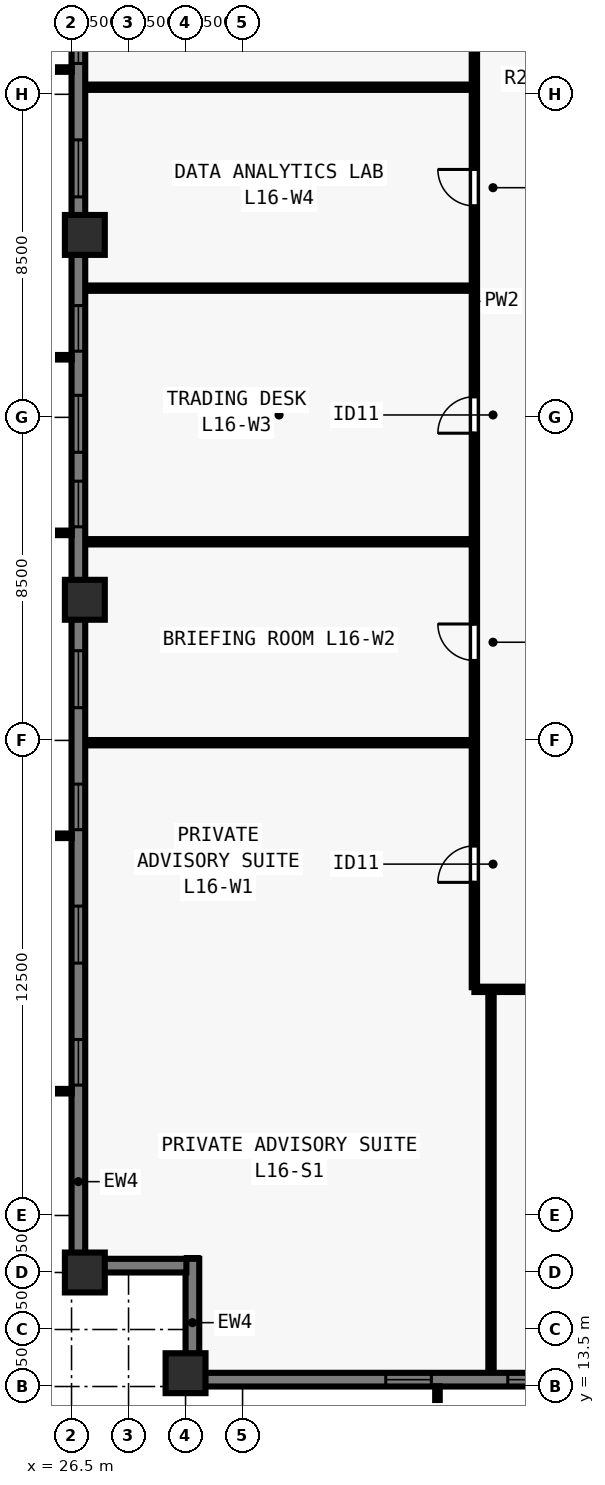
"""IFC4 building model, lengths in metres.
Left out: names, types, materials, properties, quantities, classifications, styles, units other than length and angle.
Written with IfcOpenShell. Run it as: python <this file> out.ifc"""

import sys

from ifc_helpers import new_model, si_unit, direction, frame, frame_2d, origin, origin_2d, place, context, subcontext, project, spatial, rectangle, extrude, element, fill, save


model = new_model("IFC4")
c1 = context("Model", 3, precision=1e-05, world=origin(), true_north=direction((0.0, 1.0)))
c2 = subcontext(c1, "Body", "Model", "MODEL_VIEW")
j1 = project(units=[si_unit("LENGTHUNIT", "METRE"), si_unit("PLANEANGLEUNIT", "RADIAN")], contexts=[c1])
p1 = place(None, origin())
s1 = spatial("IfcSite", under=j1, at=p1, CompositionType="ELEMENT")
p2 = place(p1, origin())
s2 = spatial("IfcBuilding", under=s1, at=p2, CompositionType="ELEMENT")
p3 = place(p2, frame((0.0, 0.0, 62.0)))
s3 = spatial("IfcBuildingStorey", under=s2, at=p3, CompositionType="ELEMENT", Elevation=62.0)
for number, where, z_axis, x_axis in (
    (1, (29.5, 13.85, 0.0), (0.0, 0.0, 1.0), (1.0, 0.0, 0.0)),
    (2, (26.85, 43.8, 0.0), (0.0, 0.0, 1.0), (0.0, 1.0, 0.0)),
    (3, (26.85, 34.2, 0.0), (0.0, 0.0, 1.0), (0.0, 1.0, 0.0)),
    (4, (26.85, 16.5, 0.0), (0.0, 0.0, 1.0), (0.0, 1.0, 0.0)),
):
    element("IfcColumn", number, at=place(p3, frame(where, z_axis=z_axis, x_axis=x_axis)), inside=s3, PredefinedType="COLUMN", context=c2, shape_type="SweptSolid", body=[
        extrude(rectangle(XDim=1.05, YDim=1.05, at=origin_2d()), origin(), (0.0, 0.0, 1.0), 3.5),
    ])
p4 = place(p3, frame((74.5, 13.68, 0.0), z_axis=(0.0, 0.0, 1.0), x_axis=(-1.0, 0.0, 0.0)))
e5 = element("IfcWall", 5, at=p4, inside=s3, PredefinedType="SOLIDWALL", context=c2, shape_type="SweptSolid", body=[
    extrude(rectangle(XDim=44.662, YDim=0.36, at=frame_2d((22.331, 0.0))), origin(), (0.0, 0.0, 1.0), 3.28),
])
p5 = place(p4, frame((4.93, 0.0, 0.8)))
e6 = element("IfcOpeningElement", 6, at=p5, cuts=e5, PredefinedType="OPENING", context=c2, shape_type="SweptSolid", body=[
    extrude(rectangle(XDim=1.2, YDim=1.544, at=frame_2d((0.6, 0.772))), frame((0.0, 0.19, 0.0), z_axis=(0.0, -1.0, 0.0), x_axis=(1.0, 0.0, 0.0)), (0.0, 0.0, 1.0), 0.38),
])
p6 = place(p4, frame((8.59, 0.0, 0.8)))
e7 = element("IfcOpeningElement", 7, at=p6, cuts=e5, PredefinedType="OPENING", context=c2, shape_type="SweptSolid", body=[
    extrude(rectangle(XDim=1.5, YDim=1.544, at=frame_2d((0.75, 0.772))), frame((0.0, 0.19, 0.0), z_axis=(0.0, -1.0, 0.0), x_axis=(1.0, 0.0, 0.0)), (0.0, 0.0, 1.0), 0.38),
])
p7 = place(p4, frame((11.65, 0.0, 0.8)))
e8 = element("IfcOpeningElement", 8, at=p7, cuts=e5, PredefinedType="OPENING", context=c2, shape_type="SweptSolid", body=[
    extrude(rectangle(XDim=1.2, YDim=1.544, at=frame_2d((0.6, 0.772))), frame((0.0, 0.19, 0.0), z_axis=(0.0, -1.0, 0.0), x_axis=(1.0, 0.0, 0.0)), (0.0, 0.0, 1.0), 0.38),
])
p8 = place(p4, frame((14.861, 0.0, 0.8)))
e9 = element("IfcOpeningElement", 9, at=p8, cuts=e5, PredefinedType="OPENING", context=c2, shape_type="SweptSolid", body=[
    extrude(rectangle(XDim=1.5, YDim=1.544, at=frame_2d((0.75, 0.772))), frame((0.0, 0.19, 0.0), z_axis=(0.0, -1.0, 0.0), x_axis=(1.0, 0.0, 0.0)), (0.0, 0.0, 1.0), 0.38),
])
p9 = place(p4, frame((18.821, 0.0, 0.8)))
e10 = element("IfcOpeningElement", 10, at=p9, cuts=e5, PredefinedType="OPENING", context=c2, shape_type="SweptSolid", body=[
    extrude(rectangle(XDim=1.2, YDim=1.544, at=frame_2d((0.6, 0.772))), frame((0.0, 0.19, 0.0), z_axis=(0.0, -1.0, 0.0), x_axis=(1.0, 0.0, 0.0)), (0.0, 0.0, 1.0), 0.38),
])
p10 = place(p4, frame((21.581, 0.0, 0.8)))
e11 = element("IfcOpeningElement", 11, at=p10, cuts=e5, PredefinedType="OPENING", context=c2, shape_type="SweptSolid", body=[
    extrude(rectangle(XDim=1.5, YDim=1.544, at=frame_2d((0.75, 0.772))), frame((0.0, 0.19, 0.0), z_axis=(0.0, -1.0, 0.0), x_axis=(1.0, 0.0, 0.0)), (0.0, 0.0, 1.0), 0.38),
])
p11 = place(p4, frame((25.091, 0.0, 0.8)))
e12 = element("IfcOpeningElement", 12, at=p11, cuts=e5, PredefinedType="OPENING", context=c2, shape_type="SweptSolid", body=[
    extrude(rectangle(XDim=1.2, YDim=1.544, at=frame_2d((0.6, 0.772))), frame((0.0, 0.19, 0.0), z_axis=(0.0, -1.0, 0.0), x_axis=(1.0, 0.0, 0.0)), (0.0, 0.0, 1.0), 0.38),
])
p12 = place(p4, frame((28.302, 0.0, 0.8)))
e13 = element("IfcOpeningElement", 13, at=p12, cuts=e5, PredefinedType="OPENING", context=c2, shape_type="SweptSolid", body=[
    extrude(rectangle(XDim=1.5, YDim=1.544, at=frame_2d((0.75, 0.772))), frame((0.0, 0.19, 0.0), z_axis=(0.0, -1.0, 0.0), x_axis=(1.0, 0.0, 0.0)), (0.0, 0.0, 1.0), 0.38),
])
p13 = place(p4, frame((31.812, 0.0, 0.8)))
e14 = element("IfcOpeningElement", 14, at=p13, cuts=e5, PredefinedType="OPENING", context=c2, shape_type="SweptSolid", body=[
    extrude(rectangle(XDim=1.2, YDim=1.544, at=frame_2d((0.6, 0.772))), frame((0.0, 0.19, 0.0), z_axis=(0.0, -1.0, 0.0), x_axis=(1.0, 0.0, 0.0)), (0.0, 0.0, 1.0), 0.38),
])
p14 = place(p4, frame((35.022, 0.0, 0.8)))
e15 = element("IfcOpeningElement", 15, at=p14, cuts=e5, PredefinedType="OPENING", context=c2, shape_type="SweptSolid", body=[
    extrude(rectangle(XDim=1.5, YDim=1.544, at=frame_2d((0.75, 0.772))), frame((0.0, 0.19, 0.0), z_axis=(0.0, -1.0, 0.0), x_axis=(1.0, 0.0, 0.0)), (0.0, 0.0, 1.0), 0.38),
])
p15 = place(p4, frame((38.532, 0.0, 0.8)))
e16 = element("IfcOpeningElement", 16, at=p15, cuts=e5, PredefinedType="OPENING", context=c2, shape_type="SweptSolid", body=[
    extrude(rectangle(XDim=1.2, YDim=1.544, at=frame_2d((0.6, 0.772))), frame((0.0, 0.19, 0.0), z_axis=(0.0, -1.0, 0.0), x_axis=(1.0, 0.0, 0.0)), (0.0, 0.0, 1.0), 0.38),
])
p16 = place(p3, frame((29.68, 13.5, 0.0), z_axis=(0.0, 0.0, 1.0), x_axis=(0.0, 1.0, 0.0)))
e17 = element("IfcWall", 17, at=p16, inside=s3, PredefinedType="SOLIDWALL", context=c2, shape_type="SweptSolid", body=[
    extrude(rectangle(XDim=3.36, YDim=0.36, at=frame_2d((1.68, 0.0))), origin(), (0.0, 0.0, 1.0), 3.28),
])
p17 = place(p3, frame((29.522, 16.68, 0.0), z_axis=(0.0, 0.0, 1.0), x_axis=(-1.0, 0.0, 0.0)))
e18 = element("IfcWall", 18, at=p17, inside=s3, PredefinedType="SOLIDWALL", context=c2, shape_type="SweptSolid", body=[
    extrude(rectangle(XDim=2.684, YDim=0.36, at=frame_2d((1.342, 0.0))), origin(), (0.0, 0.0, 1.0), 3.28),
])
p18 = place(p3, frame((26.68, 16.5, 0.0), z_axis=(0.0, 0.0, 1.0), x_axis=(0.0, 1.0, 0.0)))
e19 = element("IfcWall", 19, at=p18, inside=s3, PredefinedType="SOLIDWALL", context=c2, shape_type="SweptSolid", body=[
    extrude(rectangle(XDim=44.662, YDim=0.36, at=frame_2d((22.331, 0.0))), origin(), (0.0, 0.0, 1.0), 3.28),
])
p19 = place(p18, frame((4.93, 0.0, 0.8)))
e20 = element("IfcOpeningElement", 20, at=p19, cuts=e19, PredefinedType="OPENING", context=c2, shape_type="SweptSolid", body=[
    extrude(rectangle(XDim=1.2, YDim=1.544, at=frame_2d((0.6, 0.772))), frame((0.0, 0.19, 0.0), z_axis=(0.0, -1.0, 0.0), x_axis=(1.0, 0.0, 0.0)), (0.0, 0.0, 1.0), 0.38),
])
p20 = place(p18, frame((8.14, 0.0, 0.8)))
e21 = element("IfcOpeningElement", 21, at=p20, cuts=e19, PredefinedType="OPENING", context=c2, shape_type="SweptSolid", body=[
    extrude(rectangle(XDim=1.5, YDim=1.544, at=frame_2d((0.75, 0.772))), frame((0.0, 0.19, 0.0), z_axis=(0.0, -1.0, 0.0), x_axis=(1.0, 0.0, 0.0)), (0.0, 0.0, 1.0), 0.38),
])
p21 = place(p18, frame((11.65, 0.0, 0.8)))
e22 = element("IfcOpeningElement", 22, at=p21, cuts=e19, PredefinedType="OPENING", context=c2, shape_type="SweptSolid", body=[
    extrude(rectangle(XDim=1.2, YDim=1.544, at=frame_2d((0.6, 0.772))), frame((0.0, 0.19, 0.0), z_axis=(0.0, -1.0, 0.0), x_axis=(1.0, 0.0, 0.0)), (0.0, 0.0, 1.0), 0.38),
])
p22 = place(p18, frame((14.861, 0.0, 0.8)))
e23 = element("IfcOpeningElement", 23, at=p22, cuts=e19, PredefinedType="OPENING", context=c2, shape_type="SweptSolid", body=[
    extrude(rectangle(XDim=1.5, YDim=1.544, at=frame_2d((0.75, 0.772))), frame((0.0, 0.19, 0.0), z_axis=(0.0, -1.0, 0.0), x_axis=(1.0, 0.0, 0.0)), (0.0, 0.0, 1.0), 0.38),
])
p23 = place(p18, frame((19.621, 0.0, 0.8)))
e24 = element("IfcOpeningElement", 24, at=p23, cuts=e19, PredefinedType="OPENING", context=c2, shape_type="SweptSolid", body=[
    extrude(rectangle(XDim=1.2, YDim=1.544, at=frame_2d((0.6, 0.772))), frame((0.0, 0.19, 0.0), z_axis=(0.0, -1.0, 0.0), x_axis=(1.0, 0.0, 0.0)), (0.0, 0.0, 1.0), 0.38),
])
p24 = place(p18, frame((21.581, 0.0, 0.8)))
e25 = element("IfcOpeningElement", 25, at=p24, cuts=e19, PredefinedType="OPENING", context=c2, shape_type="SweptSolid", body=[
    extrude(rectangle(XDim=1.5, YDim=1.544, at=frame_2d((0.75, 0.772))), frame((0.0, 0.19, 0.0), z_axis=(0.0, -1.0, 0.0), x_axis=(1.0, 0.0, 0.0)), (0.0, 0.0, 1.0), 0.38),
])
p25 = place(p18, frame((24.241, 0.0, 0.8)))
e26 = element("IfcOpeningElement", 26, at=p25, cuts=e19, PredefinedType="OPENING", context=c2, shape_type="SweptSolid", body=[
    extrude(rectangle(XDim=1.2, YDim=1.544, at=frame_2d((0.6, 0.772))), frame((0.0, 0.19, 0.0), z_axis=(0.0, -1.0, 0.0), x_axis=(1.0, 0.0, 0.0)), (0.0, 0.0, 1.0), 0.38),
])
p26 = place(p18, frame((28.302, 0.0, 0.8)))
e27 = element("IfcOpeningElement", 27, at=p26, cuts=e19, PredefinedType="OPENING", context=c2, shape_type="SweptSolid", body=[
    extrude(rectangle(XDim=1.5, YDim=1.544, at=frame_2d((0.75, 0.772))), frame((0.0, 0.19, 0.0), z_axis=(0.0, -1.0, 0.0), x_axis=(1.0, 0.0, 0.0)), (0.0, 0.0, 1.0), 0.38),
])
p27 = place(p18, frame((31.812, 0.0, 0.8)))
e28 = element("IfcOpeningElement", 28, at=p27, cuts=e19, PredefinedType="OPENING", context=c2, shape_type="SweptSolid", body=[
    extrude(rectangle(XDim=1.2, YDim=1.544, at=frame_2d((0.6, 0.772))), frame((0.0, 0.19, 0.0), z_axis=(0.0, -1.0, 0.0), x_axis=(1.0, 0.0, 0.0)), (0.0, 0.0, 1.0), 0.38),
])
p28 = place(p18, frame((35.022, 0.0, 0.8)))
e29 = element("IfcOpeningElement", 29, at=p28, cuts=e19, PredefinedType="OPENING", context=c2, shape_type="SweptSolid", body=[
    extrude(rectangle(XDim=1.5, YDim=1.544, at=frame_2d((0.75, 0.772))), frame((0.0, 0.19, 0.0), z_axis=(0.0, -1.0, 0.0), x_axis=(1.0, 0.0, 0.0)), (0.0, 0.0, 1.0), 0.38),
])
p29 = place(p18, frame((38.532, 0.0, 0.8)))
e30 = element("IfcOpeningElement", 30, at=p29, cuts=e19, PredefinedType="OPENING", context=c2, shape_type="SweptSolid", body=[
    extrude(rectangle(XDim=1.2, YDim=1.544, at=frame_2d((0.6, 0.772))), frame((0.0, 0.19, 0.0), z_axis=(0.0, -1.0, 0.0), x_axis=(1.0, 0.0, 0.0)), (0.0, 0.0, 1.0), 0.38),
])
p30 = place(p3, frame((37.1, 23.95, 0.0), z_axis=(0.0, 0.0, 1.0), x_axis=(1.0, 0.0, 0.0)))
e31 = element("IfcWall", 31, at=p30, inside=s3, PredefinedType="PARTITIONING", context=c2, shape_type="SweptSolid", body=[
    extrude(rectangle(XDim=29.8, YDim=0.14, at=frame_2d((14.9, 0.0))), origin(), (0.0, 0.0, 1.0), 3.28),
])
p31 = place(p30, frame((4.191, 0.0, 0.0)))
e32 = element("IfcOpeningElement", 32, at=p31, cuts=e31, PredefinedType="OPENING", context=c2, shape_type="SweptSolid", body=[
    extrude(rectangle(XDim=0.96, YDim=2.12, at=frame_2d((0.48, 1.06))), frame((0.0, 0.08, 0.0), z_axis=(0.0, -1.0, 0.0), x_axis=(1.0, 0.0, 0.0)), (0.0, 0.0, 1.0), 0.16),
])
p32 = place(p30, frame((5.358, 0.0, 0.0)))
e33 = element("IfcOpeningElement", 33, at=p32, cuts=e31, PredefinedType="OPENING", context=c2, shape_type="SweptSolid", body=[
    extrude(rectangle(XDim=0.96, YDim=2.12, at=frame_2d((0.48, 1.06))), frame((0.0, 0.08, 0.0), z_axis=(0.0, -1.0, 0.0), x_axis=(1.0, 0.0, 0.0)), (0.0, 0.0, 1.0), 0.16),
])
p33 = place(p30, frame((14.51, 0.0, 0.0)))
e34 = element("IfcOpeningElement", 34, at=p33, cuts=e31, PredefinedType="OPENING", context=c2, shape_type="SweptSolid", body=[
    extrude(rectangle(XDim=0.96, YDim=2.12, at=frame_2d((0.48, 1.06))), frame((0.0, 0.08, 0.0), z_axis=(0.0, -1.0, 0.0), x_axis=(1.0, 0.0, 0.0)), (0.0, 0.0, 1.0), 0.16),
])
p34 = place(p30, frame((24.542, 0.0, 0.0)))
e35 = element("IfcOpeningElement", 35, at=p34, cuts=e31, PredefinedType="OPENING", context=c2, shape_type="SweptSolid", body=[
    extrude(rectangle(XDim=0.96, YDim=2.12, at=frame_2d((0.48, 1.06))), frame((0.0, 0.08, 0.0), z_axis=(0.0, -1.0, 0.0), x_axis=(1.0, 0.0, 0.0)), (0.0, 0.0, 1.0), 0.16),
])
p35 = place(p30, frame((28.26, 0.0, 0.0)))
e36 = element("IfcOpeningElement", 36, at=p35, cuts=e31, PredefinedType="OPENING", context=c2, shape_type="SweptSolid", body=[
    extrude(rectangle(XDim=0.96, YDim=2.12, at=frame_2d((0.48, 1.06))), frame((0.0, 0.08, 0.0), z_axis=(0.0, -1.0, 0.0), x_axis=(1.0, 0.0, 0.0)), (0.0, 0.0, 1.0), 0.16),
])
p36 = place(p3, frame((37.1, 24.005, 0.0), z_axis=(0.0, 0.0, 1.0), x_axis=(0.0, 1.0, 0.0)))
e37 = element("IfcWall", 37, at=p36, inside=s3, PredefinedType="PARTITIONING", context=c2, shape_type="SweptSolid", body=[
    extrude(rectangle(XDim=29.99, YDim=0.14, at=frame_2d((14.995, 0.0))), origin(), (0.0, 0.0, 1.0), 3.28),
])
p37 = place(p36, frame((2.76, 0.0, 0.0)))
e38 = element("IfcOpeningElement", 38, at=p37, cuts=e37, PredefinedType="OPENING", context=c2, shape_type="SweptSolid", body=[
    extrude(rectangle(XDim=0.96, YDim=2.12, at=frame_2d((0.48, 1.06))), frame((0.0, 0.08, 0.0), z_axis=(0.0, -1.0, 0.0), x_axis=(1.0, 0.0, 0.0)), (0.0, 0.0, 1.0), 0.16),
])
p38 = place(p36, frame((8.598, 0.0, 0.0)))
e39 = element("IfcOpeningElement", 39, at=p38, cuts=e37, PredefinedType="OPENING", context=c2, shape_type="SweptSolid", body=[
    extrude(rectangle(XDim=0.96, YDim=2.12, at=frame_2d((0.48, 1.06))), frame((0.0, 0.08, 0.0), z_axis=(0.0, -1.0, 0.0), x_axis=(1.0, 0.0, 0.0)), (0.0, 0.0, 1.0), 0.16),
])
p39 = place(p36, frame((14.578, 0.0, 0.0)))
e40 = element("IfcOpeningElement", 40, at=p39, cuts=e37, PredefinedType="OPENING", context=c2, shape_type="SweptSolid", body=[
    extrude(rectangle(XDim=0.96, YDim=2.12, at=frame_2d((0.48, 1.06))), frame((0.0, 0.08, 0.0), z_axis=(0.0, -1.0, 0.0), x_axis=(1.0, 0.0, 0.0)), (0.0, 0.0, 1.0), 0.16),
])
p40 = place(p36, frame((20.558, 0.0, 0.0)))
e41 = element("IfcOpeningElement", 41, at=p40, cuts=e37, PredefinedType="OPENING", context=c2, shape_type="SweptSolid", body=[
    extrude(rectangle(XDim=0.96, YDim=2.12, at=frame_2d((0.48, 1.06))), frame((0.0, 0.08, 0.0), z_axis=(0.0, -1.0, 0.0), x_axis=(1.0, 0.0, 0.0)), (0.0, 0.0, 1.0), 0.16),
])
p41 = place(p36, frame((26.333, 0.0, 0.0)))
e42 = element("IfcOpeningElement", 42, at=p41, cuts=e37, PredefinedType="OPENING", context=c2, shape_type="SweptSolid", body=[
    extrude(rectangle(XDim=0.96, YDim=2.12, at=frame_2d((0.48, 1.06))), frame((0.0, 0.08, 0.0), z_axis=(0.0, -1.0, 0.0), x_axis=(1.0, 0.0, 0.0)), (0.0, 0.0, 1.0), 0.16),
])
p42 = place(p3, frame((37.537, 13.92, 0.0), z_axis=(0.0, 0.0, 1.0), x_axis=(0.0, 1.0, 0.0)))
e43 = element("IfcWall", 43, at=p42, inside=s3, PredefinedType="PARTITIONING", context=c2, shape_type="SweptSolid", body=[
    extrude(rectangle(XDim=9.93, YDim=0.14, at=frame_2d((4.965, 0.0))), origin(), (0.0, 0.0, 1.0), 2.439),
])
p43 = place(p3, frame((26.92, 30.439, 0.0), z_axis=(0.0, 0.0, 1.0), x_axis=(1.0, 0.0, 0.0)))
e44 = element("IfcWall", 44, at=p43, inside=s3, PredefinedType="PARTITIONING", context=c2, shape_type="SweptSolid", body=[
    extrude(rectangle(XDim=10.08, YDim=0.14, at=frame_2d((5.04, 0.0))), origin(), (0.0, 0.0, 1.0), 3.28),
])
p44 = place(p3, frame((26.92, 35.727, 0.0), z_axis=(0.0, 0.0, 1.0), x_axis=(1.0, 0.0, 0.0)))
e45 = element("IfcWall", 45, at=p44, inside=s3, PredefinedType="PARTITIONING", context=c2, shape_type="SweptSolid", body=[
    extrude(rectangle(XDim=10.08, YDim=0.14, at=frame_2d((5.04, 0.0))), origin(), (0.0, 0.0, 1.0), 2.849),
])
for number, where, z_axis, x_axis in (
    (46, (26.92, 42.399, 0.0), (0.0, 0.0, 1.0), (1.0, 0.0, 0.0)),
    (47, (26.92, 47.687, 0.0), (0.0, 0.0, 1.0), (1.0, 0.0, 0.0)),
):
    element("IfcWall", number, at=place(p3, frame(where, z_axis=z_axis, x_axis=x_axis)), inside=s3, PredefinedType="PARTITIONING", context=c2, shape_type="SweptSolid", body=[
        extrude(rectangle(XDim=10.08, YDim=0.14, at=frame_2d((5.04, 0.0))), origin(), (0.0, 0.0, 1.0), 3.28),
    ])
p45 = place(p14, origin())
e48 = element("IfcWindow", 48, at=p45, inside=s3, PartitioningType="SINGLE_PANEL", PredefinedType="WINDOW", context=c2, shape_type="SweptSolid", body=[
    extrude(rectangle(XDim=1.5, YDim=1.544, at=frame_2d((0.75, 0.772))), frame((0.0, -0.05, 0.0), z_axis=(0.0, -1.0, 0.0), x_axis=(1.0, 0.0, 0.0)), (0.0, 0.0, 1.0), 0.06),
])
fill(e15, e48)
p46 = place(p15, origin())
e49 = element("IfcWindow", 49, at=p46, inside=s3, PartitioningType="SINGLE_PANEL", PredefinedType="WINDOW", context=c2, shape_type="SweptSolid", body=[
    extrude(rectangle(XDim=1.2, YDim=1.544, at=frame_2d((0.6, 0.772))), frame((0.0, -0.05, 0.0), z_axis=(0.0, -1.0, 0.0), x_axis=(1.0, 0.0, 0.0)), (0.0, 0.0, 1.0), 0.06),
])
fill(e16, e49)
p47 = place(p19, origin())
e50 = element("IfcWindow", 50, at=p47, inside=s3, PartitioningType="SINGLE_PANEL", PredefinedType="WINDOW", context=c2, shape_type="SweptSolid", body=[
    extrude(rectangle(XDim=1.2, YDim=1.544, at=frame_2d((0.6, 0.772))), frame((0.0, -0.05, 0.0), z_axis=(0.0, -1.0, 0.0), x_axis=(1.0, 0.0, 0.0)), (0.0, 0.0, 1.0), 0.06),
])
fill(e20, e50)
p48 = place(p20, origin())
e51 = element("IfcWindow", 51, at=p48, inside=s3, PartitioningType="SINGLE_PANEL", PredefinedType="WINDOW", context=c2, shape_type="SweptSolid", body=[
    extrude(rectangle(XDim=1.5, YDim=1.544, at=frame_2d((0.75, 0.772))), frame((0.0, -0.05, 0.0), z_axis=(0.0, -1.0, 0.0), x_axis=(1.0, 0.0, 0.0)), (0.0, 0.0, 1.0), 0.06),
])
fill(e21, e51)
p49 = place(p21, origin())
e52 = element("IfcWindow", 52, at=p49, inside=s3, PartitioningType="SINGLE_PANEL", PredefinedType="WINDOW", context=c2, shape_type="SweptSolid", body=[
    extrude(rectangle(XDim=1.2, YDim=1.544, at=frame_2d((0.6, 0.772))), frame((0.0, -0.05, 0.0), z_axis=(0.0, -1.0, 0.0), x_axis=(1.0, 0.0, 0.0)), (0.0, 0.0, 1.0), 0.06),
])
fill(e22, e52)
p50 = place(p22, origin())
e53 = element("IfcWindow", 53, at=p50, inside=s3, PartitioningType="SINGLE_PANEL", PredefinedType="WINDOW", context=c2, shape_type="SweptSolid", body=[
    extrude(rectangle(XDim=1.5, YDim=1.544, at=frame_2d((0.75, 0.772))), frame((0.0, -0.05, 0.0), z_axis=(0.0, -1.0, 0.0), x_axis=(1.0, 0.0, 0.0)), (0.0, 0.0, 1.0), 0.06),
])
fill(e23, e53)
p51 = place(p23, origin())
e54 = element("IfcWindow", 54, at=p51, inside=s3, PartitioningType="SINGLE_PANEL", PredefinedType="WINDOW", context=c2, shape_type="SweptSolid", body=[
    extrude(rectangle(XDim=1.2, YDim=1.544, at=frame_2d((0.6, 0.772))), frame((0.0, -0.05, 0.0), z_axis=(0.0, -1.0, 0.0), x_axis=(1.0, 0.0, 0.0)), (0.0, 0.0, 1.0), 0.06),
])
fill(e24, e54)
p52 = place(p24, origin())
e55 = element("IfcWindow", 55, at=p52, inside=s3, PartitioningType="SINGLE_PANEL", PredefinedType="WINDOW", context=c2, shape_type="SweptSolid", body=[
    extrude(rectangle(XDim=1.5, YDim=1.544, at=frame_2d((0.75, 0.772))), frame((0.0, -0.05, 0.0), z_axis=(0.0, -1.0, 0.0), x_axis=(1.0, 0.0, 0.0)), (0.0, 0.0, 1.0), 0.06),
])
fill(e25, e55)
p53 = place(p25, origin())
e56 = element("IfcWindow", 56, at=p53, inside=s3, PartitioningType="SINGLE_PANEL", PredefinedType="WINDOW", context=c2, shape_type="SweptSolid", body=[
    extrude(rectangle(XDim=1.2, YDim=1.544, at=frame_2d((0.6, 0.772))), frame((0.0, -0.05, 0.0), z_axis=(0.0, -1.0, 0.0), x_axis=(1.0, 0.0, 0.0)), (0.0, 0.0, 1.0), 0.06),
])
fill(e26, e56)
p54 = place(p26, origin())
e57 = element("IfcWindow", 57, at=p54, inside=s3, PartitioningType="SINGLE_PANEL", PredefinedType="WINDOW", context=c2, shape_type="SweptSolid", body=[
    extrude(rectangle(XDim=1.5, YDim=1.544, at=frame_2d((0.75, 0.772))), frame((0.0, -0.05, 0.0), z_axis=(0.0, -1.0, 0.0), x_axis=(1.0, 0.0, 0.0)), (0.0, 0.0, 1.0), 0.06),
])
fill(e27, e57)
p55 = place(p27, origin())
e58 = element("IfcWindow", 58, at=p55, inside=s3, PartitioningType="SINGLE_PANEL", PredefinedType="WINDOW", context=c2, shape_type="SweptSolid", body=[
    extrude(rectangle(XDim=1.2, YDim=1.544, at=frame_2d((0.6, 0.772))), frame((0.0, -0.05, 0.0), z_axis=(0.0, -1.0, 0.0), x_axis=(1.0, 0.0, 0.0)), (0.0, 0.0, 1.0), 0.06),
])
fill(e28, e58)
p56 = place(p37, origin())
e59 = element("IfcDoor", 59, at=p56, inside=s3, OperationType="SINGLE_SWING_LEFT", PredefinedType="DOOR", context=c2, shape_type="SweptSolid", body=[
    extrude(rectangle(XDim=0.96, YDim=2.12, at=frame_2d((0.48, 1.06))), frame((0.0, 0.025, 0.0), z_axis=(0.0, -1.0, 0.0), x_axis=(1.0, 0.0, 0.0)), (0.0, 0.0, 1.0), 0.05),
])
fill(e38, e59)
p57 = place(p38, origin())
e60 = element("IfcDoor", 60, at=p57, inside=s3, OperationType="SINGLE_SWING_RIGHT", PredefinedType="DOOR", context=c2, shape_type="SweptSolid", body=[
    extrude(rectangle(XDim=0.96, YDim=2.12, at=frame_2d((0.48, 1.06))), frame((0.0, 0.025, 0.0), z_axis=(0.0, -1.0, 0.0), x_axis=(1.0, 0.0, 0.0)), (0.0, 0.0, 1.0), 0.05),
])
fill(e39, e60)
p58 = place(p39, origin())
e61 = element("IfcDoor", 61, at=p58, inside=s3, OperationType="SINGLE_SWING_LEFT", PredefinedType="DOOR", context=c2, shape_type="SweptSolid", body=[
    extrude(rectangle(XDim=0.96, YDim=2.12, at=frame_2d((0.48, 1.06))), frame((0.0, 0.025, 0.0), z_axis=(0.0, -1.0, 0.0), x_axis=(1.0, 0.0, 0.0)), (0.0, 0.0, 1.0), 0.05),
])
fill(e40, e61)
p59 = place(p40, origin())
e62 = element("IfcDoor", 62, at=p59, inside=s3, OperationType="SINGLE_SWING_RIGHT", PredefinedType="DOOR", context=c2, shape_type="SweptSolid", body=[
    extrude(rectangle(XDim=0.96, YDim=2.12, at=frame_2d((0.48, 1.06))), frame((0.0, 0.025, 0.0), z_axis=(0.0, -1.0, 0.0), x_axis=(1.0, 0.0, 0.0)), (0.0, 0.0, 1.0), 0.05),
])
fill(e41, e62)
save(model, sys.argv[1])
